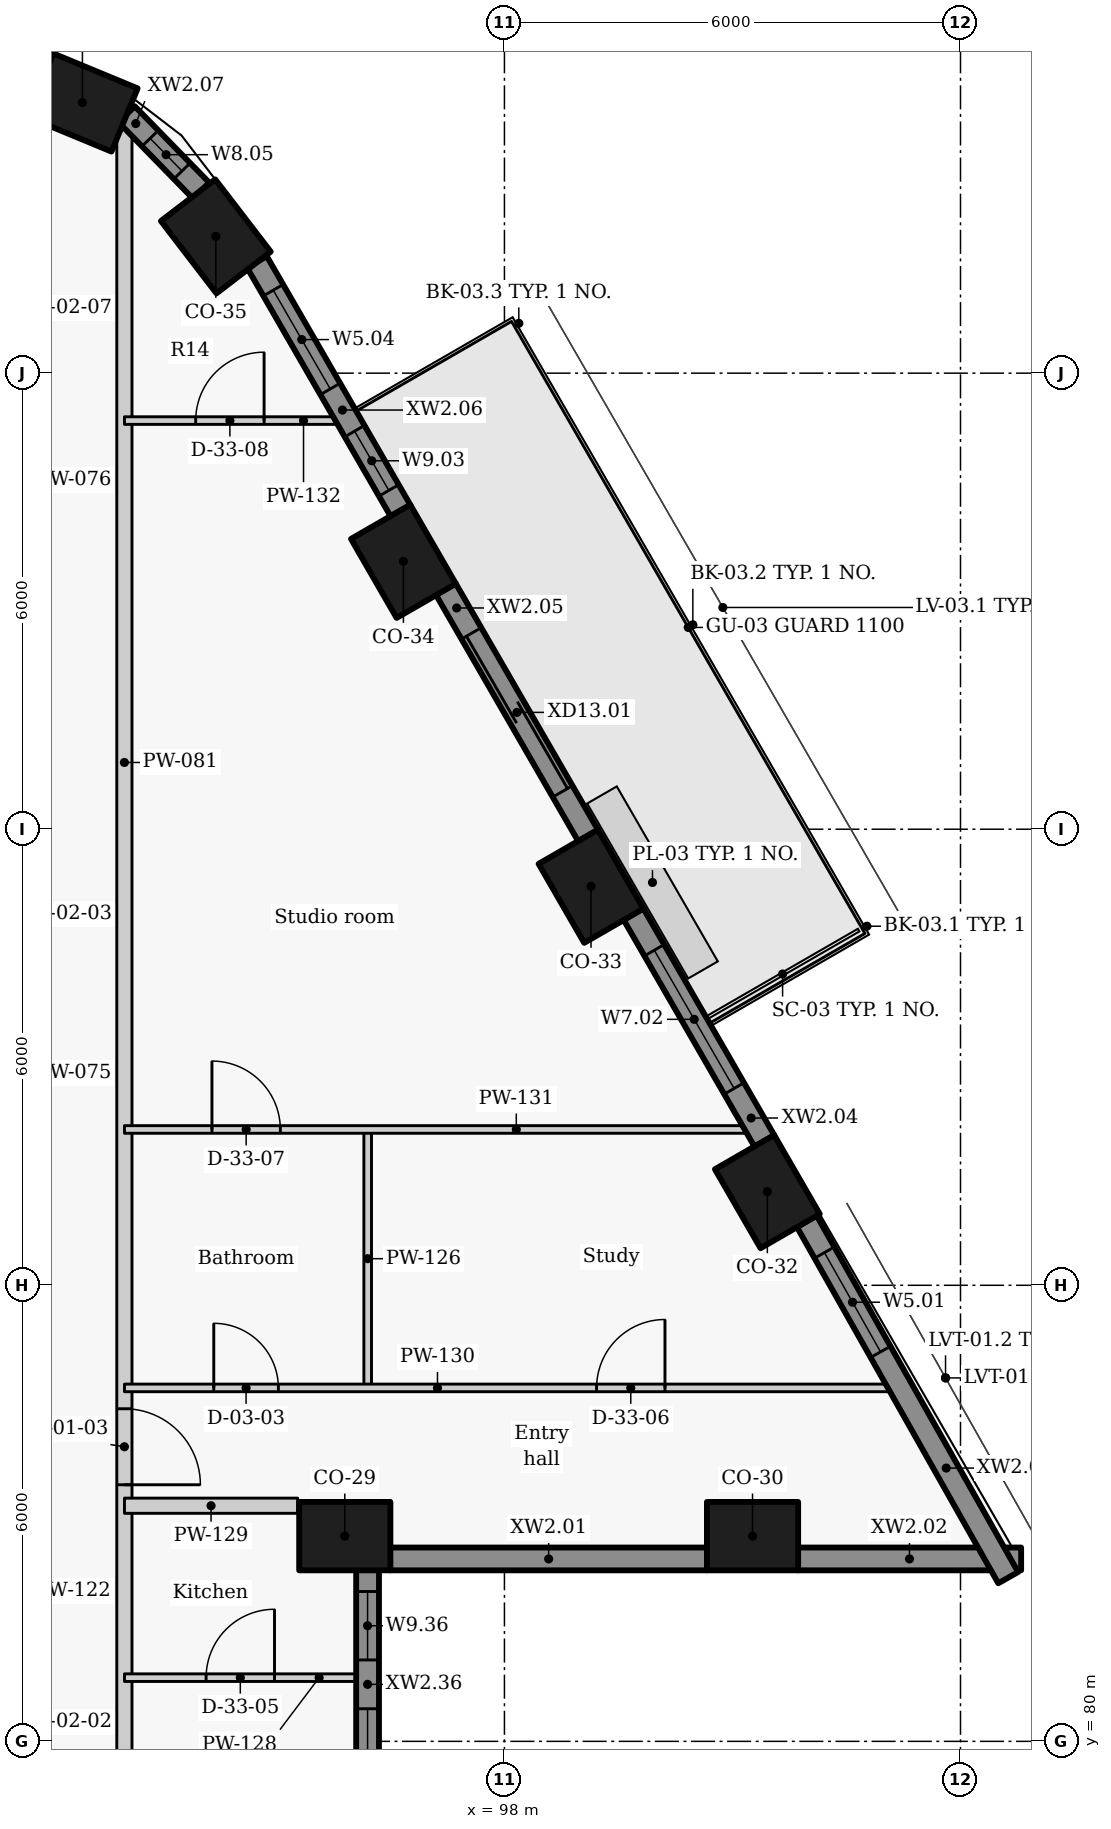
"""IFC4 building model, lengths in metres.
Left out: names, types, materials, properties, quantities, classifications, styles, units other than length and angle.
Written with IfcOpenShell. Run it as: python <this file> out.ifc"""

import sys

from ifc_helpers import new_model, si_unit, direction, frame, frame_2d, origin, origin_2d, place, context, subcontext, project, spatial, rectangle, extrude, element, fill, save


model = new_model("IFC4")
c1 = context("Model", 3, precision=1e-05, world=origin(), true_north=direction((0.0, 1.0)))
c2 = subcontext(c1, "Body", "Model", "MODEL_VIEW")
j1 = project(units=[si_unit("LENGTHUNIT", "METRE"), si_unit("PLANEANGLEUNIT", "RADIAN")], contexts=[c1])
p1 = place(None, origin())
s1 = spatial("IfcSite", under=j1, at=p1, CompositionType="ELEMENT")
p2 = place(p1, origin())
s2 = spatial("IfcBuilding", under=s1, at=p2, CompositionType="ELEMENT")
p3 = place(p2, frame((0.0, 0.0, 176.7)))
s3 = spatial("IfcBuildingStorey", under=s2, at=p3, CompositionType="ELEMENT", Elevation=176.7)
for number, where, z_axis, x_axis in (
    (1, (95.899, 82.7, 0.0), (0.0, 0.0, 1.0), (1.0, 0.0, 0.0)),
    (2, (101.264, 82.7, 0.0), (0.0, 0.0, 1.0), (1.0, 0.0, 0.0)),
    (3, (101.459, 87.232, 0.0), (0.0, 0.0, 1.0), (-0.5, 0.866, 0.0)),
    (4, (99.139, 91.25, 0.0), (0.0, 0.0, 1.0), (-0.5, 0.866, 0.0)),
    (5, (96.671, 95.525, 0.0), (0.0, 0.0, 1.0), (-0.5, 0.866, 0.0)),
    (6, (94.203, 99.8, 0.0), (0.0, 0.0, 1.0), (-0.609, 0.793, 0.0)),
    (7, (92.448, 101.56, 0.0), (0.0, 0.0, 1.0), (-0.924, 0.383, 0.0)),
):
    element("IfcColumn", number, at=place(p3, frame(where, z_axis=z_axis, x_axis=x_axis)), inside=s3, PredefinedType="COLUMN", context=c2, shape_type="SweptSolid", body=[
        extrude(rectangle(XDim=1.2, YDim=0.9, at=origin_2d()), origin(), (0.0, 0.0, 1.0), 3.3),
    ])
p4 = place(p3, frame((96.496, 82.4, 0.0), z_axis=(0.0, 0.0, 1.0), x_axis=(1.0, 0.0, 0.0)))
e8 = element("IfcWall", 8, at=p4, inside=s3, PredefinedType="SOLIDWALL", context=c2, shape_type="SweptSolid", body=[
    extrude(rectangle(XDim=4.172, YDim=0.3, at=frame_2d((2.086, 0.0))), origin(), (0.0, 0.0, 1.0), 2.425),
])
p5 = place(p3, frame((101.86, 82.4, 0.0), z_axis=(0.0, 0.0, 1.0), x_axis=(1.0, 0.0, 0.0)))
e9 = element("IfcWall", 9, at=p5, inside=s3, PredefinedType="SOLIDWALL", context=c2, shape_type="SweptSolid", body=[
    extrude(rectangle(XDim=2.938, YDim=0.3, at=frame_2d((1.469, 0.0))), origin(), (0.0, 0.0, 1.0), 2.425),
])
p6 = place(p3, frame((104.627, 82.154, 0.0), z_axis=(0.0, 0.0, 1.0), x_axis=(-0.492033360928, 0.870576344575, 0.0)))
e10 = element("IfcWall", 10, at=p6, inside=s3, PredefinedType="SOLIDWALL", context=c2, shape_type="SweptSolid", body=[
    extrude(rectangle(XDim=5.387, YDim=0.3, at=frame_2d((2.693, 0.0))), origin(), (0.0, 0.0, 1.0), 2.425),
])
p7 = place(p6, frame((3.412, 0.0, 0.9)))
e11 = element("IfcOpeningElement", 11, at=p7, cuts=e10, PredefinedType="OPENING", context=c2, shape_type="SweptSolid", body=[
    extrude(rectangle(XDim=1.5, YDim=1.1, at=frame_2d((0.75, 0.55))), frame((0.0, 0.16, 0.0), z_axis=(0.0, -1.0, 0.0), x_axis=(1.0, 0.0, 0.0)), (0.0, 0.0, 1.0), 0.32),
])
p8 = place(p3, frame((101.421, 87.898, 0.0), z_axis=(0.0, 0.0, 1.0), x_axis=(-0.499955427682, 0.866051136095, 0.0)))
e12 = element("IfcWall", 12, at=p8, inside=s3, PredefinedType="SOLIDWALL", context=c2, shape_type="SweptSolid", body=[
    extrude(rectangle(XDim=3.447, YDim=0.3, at=frame_2d((1.724, 0.0))), origin(), (0.0, 0.0, 1.0), 2.425),
])
p9 = place(p8, frame((0.798, 0.0, 0.9)))
e13 = element("IfcOpeningElement", 13, at=p9, cuts=e12, PredefinedType="OPENING", context=c2, shape_type="SweptSolid", body=[
    extrude(rectangle(XDim=2.1, YDim=1.1, at=frame_2d((1.05, 0.55))), frame((0.0, 0.16, 0.0), z_axis=(0.0, -1.0, 0.0), x_axis=(1.0, 0.0, 0.0)), (0.0, 0.0, 1.0), 0.32),
])
p10 = place(p3, frame((99.101, 91.916, 0.0), z_axis=(0.0, 0.0, 1.0), x_axis=(-0.500059225181, 0.86599120741, 0.0)))
e14 = element("IfcWall", 14, at=p10, inside=s3, PredefinedType="SOLIDWALL", context=c2, shape_type="SweptSolid", body=[
    extrude(rectangle(XDim=3.744, YDim=0.3, at=frame_2d((1.872, 0.0))), origin(), (0.0, 0.0, 1.0), 2.425),
])
p11 = place(p10, frame((0.672, 0.0, 0.0)))
e15 = element("IfcOpeningElement", 15, at=p11, cuts=e14, PredefinedType="OPENING", context=c2, shape_type="SweptSolid", body=[
    extrude(rectangle(XDim=2.4, YDim=2.0, at=frame_2d((1.2, 1.0))), frame((0.0, 0.16, 0.0), z_axis=(0.0, -1.0, 0.0), x_axis=(1.0, 0.0, 0.0)), (0.0, 0.0, 1.0), 0.32),
])
p12 = place(p3, frame((96.633, 96.191, 0.0), z_axis=(0.0, 0.0, 1.0), x_axis=(-0.499961087031, 0.866047869032, 0.0)))
e16 = element("IfcWall", 16, at=p12, inside=s3, PredefinedType="SOLIDWALL", context=c2, shape_type="SweptSolid", body=[
    extrude(rectangle(XDim=3.779, YDim=0.3, at=frame_2d((1.889, 0.0))), origin(), (0.0, 0.0, 1.0), 2.425),
])
p13 = place(p12, frame((0.308, 0.0, 0.9)))
e17 = element("IfcOpeningElement", 17, at=p13, cuts=e16, PredefinedType="OPENING", context=c2, shape_type="SweptSolid", body=[
    extrude(rectangle(XDim=0.9, YDim=1.1, at=frame_2d((0.45, 0.55))), frame((0.0, 0.16, 0.0), z_axis=(0.0, -1.0, 0.0), x_axis=(1.0, 0.0, 0.0)), (0.0, 0.0, 1.0), 0.32),
])
p14 = place(p12, frame((1.849, 0.0, 0.9)))
e18 = element("IfcOpeningElement", 18, at=p14, cuts=e16, PredefinedType="OPENING", context=c2, shape_type="SweptSolid", body=[
    extrude(rectangle(XDim=1.5, YDim=1.1, at=frame_2d((0.75, 0.55))), frame((0.0, 0.16, 0.0), z_axis=(0.0, -1.0, 0.0), x_axis=(1.0, 0.0, 0.0)), (0.0, 0.0, 1.0), 0.32),
])
p15 = place(p3, frame((94.009, 100.402, 0.0), z_axis=(0.0, 0.0, 1.0), x_axis=(-0.69817596362, 0.715926199984, 0.0)))
e19 = element("IfcWall", 19, at=p15, inside=s3, PredefinedType="SOLIDWALL", context=c2, shape_type="SweptSolid", body=[
    extrude(rectangle(XDim=1.403, YDim=0.3, at=frame_2d((0.701, 0.0))), origin(), (0.0, 0.0, 1.0), 2.425),
])
p16 = place(p15, frame((0.36, 0.0, 0.9)))
e20 = element("IfcOpeningElement", 20, at=p16, cuts=e19, PredefinedType="OPENING", context=c2, shape_type="SweptSolid", body=[
    extrude(rectangle(XDim=0.6, YDim=1.1, at=frame_2d((0.3, 0.55))), frame((0.0, 0.16, 0.0), z_axis=(0.0, -1.0, 0.0), x_axis=(1.0, 0.0, 0.0)), (0.0, 0.0, 1.0), 0.32),
])
p17 = place(p3, frame((96.199, 77.896, 0.0), z_axis=(0.0, 0.0, 1.0), x_axis=(0.0, 1.0, 0.0)))
e21 = element("IfcWall", 21, at=p17, inside=s3, PredefinedType="SOLIDWALL", context=c2, shape_type="SweptSolid", body=[
    extrude(rectangle(XDim=4.358, YDim=0.3, at=frame_2d((2.179, 0.0))), origin(), (0.0, 0.0, 1.0), 2.425),
])
p18 = place(p17, frame((0.433, 0.0, 0.9)))
e22 = element("IfcOpeningElement", 22, at=p18, cuts=e21, PredefinedType="OPENING", context=c2, shape_type="SweptSolid", body=[
    extrude(rectangle(XDim=2.1, YDim=1.1, at=frame_2d((1.05, 0.55))), frame((0.0, 0.16, 0.0), z_axis=(0.0, -1.0, 0.0), x_axis=(1.0, 0.0, 0.0)), (0.0, 0.0, 1.0), 0.32),
])
p19 = place(p17, frame((3.175, 0.0, 0.9)))
e23 = element("IfcOpeningElement", 23, at=p19, cuts=e21, PredefinedType="OPENING", context=c2, shape_type="SweptSolid", body=[
    extrude(rectangle(XDim=0.9, YDim=1.1, at=frame_2d((0.45, 0.55))), frame((0.0, 0.16, 0.0), z_axis=(0.0, -1.0, 0.0), x_axis=(1.0, 0.0, 0.0)), (0.0, 0.0, 1.0), 0.32),
])
p20 = place(p3, frame((93.0, 101.281, 0.0), z_axis=(0.0, 0.0, 1.0), x_axis=(0.0, -1.0, 0.0)))
e24 = element("IfcWall", 24, at=p20, inside=s3, PredefinedType="PARTITIONING", context=c2, shape_type="SweptSolid", body=[
    extrude(rectangle(XDim=42.606, YDim=0.2, at=frame_2d((21.303, 0.0))), origin(), (0.0, 0.0, 1.0), 2.405),
])
p21 = place(p20, frame((39.33, 0.0, 0.0)))
e25 = element("IfcOpeningElement", 25, at=p21, cuts=e24, PredefinedType="OPENING", context=c2, shape_type="SweptSolid", body=[
    extrude(rectangle(XDim=1.0, YDim=2.1, at=frame_2d((0.5, 1.05))), frame((0.0, 0.11, 0.0), z_axis=(0.0, -1.0, 0.0), x_axis=(1.0, 0.0, 0.0)), (0.0, 0.0, 1.0), 0.22),
])
p22 = place(p20, frame((28.005, 0.0, 0.0)))
e26 = element("IfcOpeningElement", 26, at=p22, cuts=e24, PredefinedType="OPENING", context=c2, shape_type="SweptSolid", body=[
    extrude(rectangle(XDim=1.0, YDim=2.1, at=frame_2d((0.5, 1.05))), frame((0.0, 0.11, 0.0), z_axis=(0.0, -1.0, 0.0), x_axis=(1.0, 0.0, 0.0)), (0.0, 0.0, 1.0), 0.22),
])
p23 = place(p20, frame((16.905, 0.0, 0.0)))
e27 = element("IfcOpeningElement", 27, at=p23, cuts=e24, PredefinedType="OPENING", context=c2, shape_type="SweptSolid", body=[
    extrude(rectangle(XDim=1.0, YDim=2.1, at=frame_2d((0.5, 1.05))), frame((0.0, 0.11, 0.0), z_axis=(0.0, -1.0, 0.0), x_axis=(1.0, 0.0, 0.0)), (0.0, 0.0, 1.0), 0.22),
])
p24 = place(p3, frame((96.201, 84.65, 0.0), z_axis=(0.0, 0.0, 1.0), x_axis=(0.0, 1.0, 0.0)))
e28 = element("IfcWall", 28, at=p24, inside=s3, PredefinedType="PARTITIONING", context=c2, shape_type="SweptSolid", body=[
    extrude(rectangle(XDim=3.4, YDim=0.1, at=frame_2d((1.7, 0.0))), origin(), (0.0, 0.0, 1.0), 3.025),
])
p25 = place(p3, frame((93.001, 80.838, 0.0), z_axis=(0.0, 0.0, 1.0), x_axis=(1.0, 0.0, 0.0)))
e29 = element("IfcWall", 29, at=p25, inside=s3, PredefinedType="PARTITIONING", context=c2, shape_type="SweptSolid", body=[
    extrude(rectangle(XDim=3.049, YDim=0.1, at=frame_2d((1.524, 0.0))), origin(), (0.0, 0.0, 1.0), 2.405),
])
p26 = place(p25, frame((1.074, 0.0, 0.0)))
e30 = element("IfcOpeningElement", 30, at=p26, cuts=e29, PredefinedType="OPENING", context=c2, shape_type="SweptSolid", body=[
    extrude(rectangle(XDim=0.9, YDim=2.1, at=frame_2d((0.45, 1.05))), frame((0.0, 0.06, 0.0), z_axis=(0.0, -1.0, 0.0), x_axis=(1.0, 0.0, 0.0)), (0.0, 0.0, 1.0), 0.12),
])
p27 = place(p3, frame((93.001, 83.1, 0.0), z_axis=(0.0, 0.0, 1.0), x_axis=(1.0, 0.0, 0.0)))
e31 = element("IfcWall", 31, at=p27, inside=s3, PredefinedType="PARTITIONING", context=c2, shape_type="SweptSolid", body=[
    extrude(rectangle(XDim=2.279, YDim=0.2, at=frame_2d((1.139, 0.0))), origin(), (0.0, 0.0, 1.0), 3.025),
])
p28 = place(p3, frame((93.001, 84.65, 0.0), z_axis=(0.0, 0.0, 1.0), x_axis=(1.0, 0.0, 0.0)))
e32 = element("IfcWall", 32, at=p28, inside=s3, PredefinedType="PARTITIONING", context=c2, shape_type="SweptSolid", body=[
    extrude(rectangle(XDim=10.122, YDim=0.1, at=frame_2d((5.061, 0.0))), origin(), (0.0, 0.0, 1.0), 2.405),
])
p29 = place(p28, frame((1.175, 0.0, 0.0)))
e33 = element("IfcOpeningElement", 33, at=p29, cuts=e32, PredefinedType="OPENING", context=c2, shape_type="SweptSolid", body=[
    extrude(rectangle(XDim=0.85, YDim=2.1, at=frame_2d((0.425, 1.05))), frame((0.0, 0.06, 0.0), z_axis=(0.0, -1.0, 0.0), x_axis=(1.0, 0.0, 0.0)), (0.0, 0.0, 1.0), 0.12),
])
p30 = place(p28, frame((6.211, 0.0, 0.0)))
e34 = element("IfcOpeningElement", 34, at=p30, cuts=e32, PredefinedType="OPENING", context=c2, shape_type="SweptSolid", body=[
    extrude(rectangle(XDim=0.9, YDim=2.1, at=frame_2d((0.45, 1.05))), frame((0.0, 0.06, 0.0), z_axis=(0.0, -1.0, 0.0), x_axis=(1.0, 0.0, 0.0)), (0.0, 0.0, 1.0), 0.12),
])
p31 = place(p3, frame((93.001, 88.05, 0.0), z_axis=(0.0, 0.0, 1.0), x_axis=(1.0, 0.0, 0.0)))
e35 = element("IfcWall", 35, at=p31, inside=s3, PredefinedType="PARTITIONING", context=c2, shape_type="SweptSolid", body=[
    extrude(rectangle(XDim=8.159, YDim=0.1, at=frame_2d((4.08, 0.0))), origin(), (0.0, 0.0, 1.0), 2.405),
])
p32 = place(p31, frame((1.151, 0.0, 0.0)))
e36 = element("IfcOpeningElement", 36, at=p32, cuts=e35, PredefinedType="OPENING", context=c2, shape_type="SweptSolid", body=[
    extrude(rectangle(XDim=0.9, YDim=2.1, at=frame_2d((0.45, 1.05))), frame((0.0, 0.06, 0.0), z_axis=(0.0, -1.0, 0.0), x_axis=(1.0, 0.0, 0.0)), (0.0, 0.0, 1.0), 0.12),
])
p33 = place(p3, frame((93.001, 97.376, 0.0), z_axis=(0.0, 0.0, 1.0), x_axis=(1.0, 0.0, 0.0)))
e37 = element("IfcWall", 37, at=p33, inside=s3, PredefinedType="PARTITIONING", context=c2, shape_type="SweptSolid", body=[
    extrude(rectangle(XDim=2.775, YDim=0.1, at=frame_2d((1.387, 0.0))), origin(), (0.0, 0.0, 1.0), 2.405),
])
p34 = place(p33, frame((0.937, 0.0, 0.0)))
e38 = element("IfcOpeningElement", 38, at=p34, cuts=e37, PredefinedType="OPENING", context=c2, shape_type="SweptSolid", body=[
    extrude(rectangle(XDim=0.9, YDim=2.1, at=frame_2d((0.45, 1.05))), frame((0.0, 0.06, 0.0), z_axis=(0.0, -1.0, 0.0), x_axis=(1.0, 0.0, 0.0)), (0.0, 0.0, 1.0), 0.12),
])
p35 = place(p7, origin())
e39 = element("IfcWindow", 39, at=p35, inside=s3, PartitioningType="SINGLE_PANEL", PredefinedType="WINDOW", context=c2, shape_type="SweptSolid", body=[
    extrude(rectangle(XDim=1.5, YDim=1.1, at=frame_2d((0.75, 0.55))), frame((0.0, 0.03, 0.0), z_axis=(0.0, -1.0, 0.0), x_axis=(1.0, 0.0, 0.0)), (0.0, 0.0, 1.0), 0.06),
])
fill(e11, e39)
p36 = place(p9, origin())
e40 = element("IfcWindow", 40, at=p36, inside=s3, PartitioningType="SINGLE_PANEL", PredefinedType="WINDOW", context=c2, shape_type="SweptSolid", body=[
    extrude(rectangle(XDim=2.1, YDim=1.1, at=frame_2d((1.05, 0.55))), frame((0.0, 0.03, 0.0), z_axis=(0.0, -1.0, 0.0), x_axis=(1.0, 0.0, 0.0)), (0.0, 0.0, 1.0), 0.06),
])
fill(e13, e40)
p37 = place(p11, origin())
e41 = element("IfcDoor", 41, at=p37, inside=s3, OperationType="DOUBLE_DOOR_SLIDING", PredefinedType="DOOR", context=c2, shape_type="SweptSolid", body=[
    extrude(rectangle(XDim=2.4, YDim=2.0, at=frame_2d((1.2, 1.0))), frame((0.0, 0.025, 0.0), z_axis=(0.0, -1.0, 0.0), x_axis=(1.0, 0.0, 0.0)), (0.0, 0.0, 1.0), 0.05),
])
fill(e15, e41)
p38 = place(p13, origin())
e42 = element("IfcWindow", 42, at=p38, inside=s3, PartitioningType="SINGLE_PANEL", PredefinedType="WINDOW", context=c2, shape_type="SweptSolid", body=[
    extrude(rectangle(XDim=0.9, YDim=1.1, at=frame_2d((0.45, 0.55))), frame((0.0, 0.03, 0.0), z_axis=(0.0, -1.0, 0.0), x_axis=(1.0, 0.0, 0.0)), (0.0, 0.0, 1.0), 0.06),
])
fill(e17, e42)
p39 = place(p14, origin())
e43 = element("IfcWindow", 43, at=p39, inside=s3, PartitioningType="SINGLE_PANEL", PredefinedType="WINDOW", context=c2, shape_type="SweptSolid", body=[
    extrude(rectangle(XDim=1.5, YDim=1.1, at=frame_2d((0.75, 0.55))), frame((0.0, 0.03, 0.0), z_axis=(0.0, -1.0, 0.0), x_axis=(1.0, 0.0, 0.0)), (0.0, 0.0, 1.0), 0.06),
])
fill(e18, e43)
p40 = place(p16, origin())
e44 = element("IfcWindow", 44, at=p40, inside=s3, PartitioningType="SINGLE_PANEL", PredefinedType="WINDOW", context=c2, shape_type="SweptSolid", body=[
    extrude(rectangle(XDim=0.6, YDim=1.1, at=frame_2d((0.3, 0.55))), frame((0.0, 0.03, 0.0), z_axis=(0.0, -1.0, 0.0), x_axis=(1.0, 0.0, 0.0)), (0.0, 0.0, 1.0), 0.06),
])
fill(e20, e44)
p41 = place(p18, origin())
e45 = element("IfcWindow", 45, at=p41, inside=s3, PartitioningType="SINGLE_PANEL", PredefinedType="WINDOW", context=c2, shape_type="SweptSolid", body=[
    extrude(rectangle(XDim=2.1, YDim=1.1, at=frame_2d((1.05, 0.55))), frame((0.0, 0.03, 0.0), z_axis=(0.0, -1.0, 0.0), x_axis=(1.0, 0.0, 0.0)), (0.0, 0.0, 1.0), 0.06),
])
fill(e22, e45)
p42 = place(p19, origin())
e46 = element("IfcWindow", 46, at=p42, inside=s3, PartitioningType="SINGLE_PANEL", PredefinedType="WINDOW", context=c2, shape_type="SweptSolid", body=[
    extrude(rectangle(XDim=0.9, YDim=1.1, at=frame_2d((0.45, 0.55))), frame((0.0, 0.03, 0.0), z_axis=(0.0, -1.0, 0.0), x_axis=(1.0, 0.0, 0.0)), (0.0, 0.0, 1.0), 0.06),
])
fill(e23, e46)
p43 = place(p26, origin())
e47 = element("IfcDoor", 47, at=p43, inside=s3, OperationType="SINGLE_SWING_RIGHT", PredefinedType="DOOR", context=c2, shape_type="SweptSolid", body=[
    extrude(rectangle(XDim=0.9, YDim=2.1, at=frame_2d((0.45, 1.05))), frame((0.0, 0.025, 0.0), z_axis=(0.0, -1.0, 0.0), x_axis=(1.0, 0.0, 0.0)), (0.0, 0.0, 1.0), 0.05),
])
fill(e30, e47)
p44 = place(p23, origin())
e48 = element("IfcDoor", 48, at=p44, inside=s3, OperationType="SINGLE_SWING_RIGHT", PredefinedType="DOOR", context=c2, shape_type="SweptSolid", body=[
    extrude(rectangle(XDim=1.0, YDim=2.1, at=frame_2d((0.5, 1.05))), frame((0.0, 0.025, 0.0), z_axis=(0.0, -1.0, 0.0), x_axis=(1.0, 0.0, 0.0)), (0.0, 0.0, 1.0), 0.05),
])
fill(e27, e48)
p45 = place(p29, origin())
e49 = element("IfcDoor", 49, at=p45, inside=s3, OperationType="SINGLE_SWING_LEFT", PredefinedType="DOOR", context=c2, shape_type="SweptSolid", body=[
    extrude(rectangle(XDim=0.85, YDim=2.1, at=frame_2d((0.425, 1.05))), frame((0.0, 0.025, 0.0), z_axis=(0.0, -1.0, 0.0), x_axis=(1.0, 0.0, 0.0)), (0.0, 0.0, 1.0), 0.05),
])
fill(e33, e49)
p46 = place(p30, origin())
e50 = element("IfcDoor", 50, at=p46, inside=s3, OperationType="SINGLE_SWING_RIGHT", PredefinedType="DOOR", context=c2, shape_type="SweptSolid", body=[
    extrude(rectangle(XDim=0.9, YDim=2.1, at=frame_2d((0.45, 1.05))), frame((0.0, 0.025, 0.0), z_axis=(0.0, -1.0, 0.0), x_axis=(1.0, 0.0, 0.0)), (0.0, 0.0, 1.0), 0.05),
])
fill(e34, e50)
p47 = place(p32, origin())
e51 = element("IfcDoor", 51, at=p47, inside=s3, OperationType="SINGLE_SWING_LEFT", PredefinedType="DOOR", context=c2, shape_type="SweptSolid", body=[
    extrude(rectangle(XDim=0.9, YDim=2.1, at=frame_2d((0.45, 1.05))), frame((0.0, 0.025, 0.0), z_axis=(0.0, -1.0, 0.0), x_axis=(1.0, 0.0, 0.0)), (0.0, 0.0, 1.0), 0.05),
])
fill(e36, e51)
p48 = place(p34, origin())
e52 = element("IfcDoor", 52, at=p48, inside=s3, OperationType="SINGLE_SWING_RIGHT", PredefinedType="DOOR", context=c2, shape_type="SweptSolid", body=[
    extrude(rectangle(XDim=0.9, YDim=2.1, at=frame_2d((0.45, 1.05))), frame((0.0, 0.025, 0.0), z_axis=(0.0, -1.0, 0.0), x_axis=(1.0, 0.0, 0.0)), (0.0, 0.0, 1.0), 0.05),
])
fill(e38, e52)
save(model, sys.argv[1])
